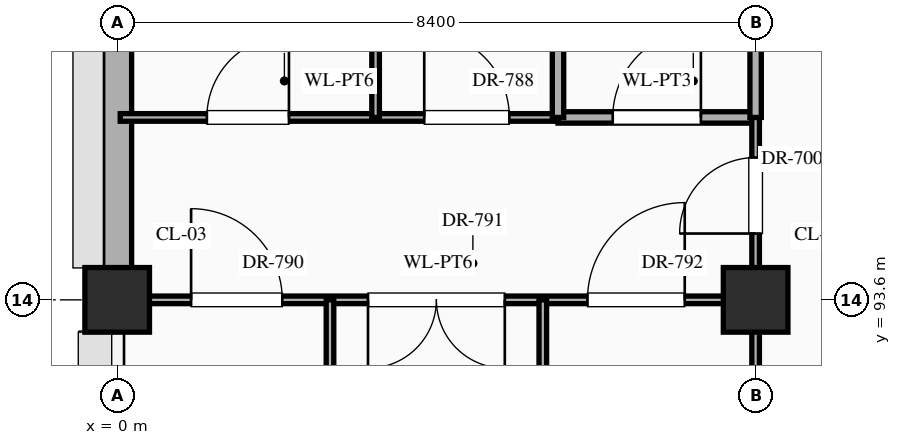
"""IFC4 building model, lengths in metres.
Left out: names, types, materials, properties, quantities, classifications, styles, units other than length and angle.
Written with IfcOpenShell. Run it as: python <this file> out.ifc"""

import sys

from ifc_helpers import new_model, si_unit, direction, frame, frame_2d, origin, origin_2d, place, context, subcontext, project, spatial, rectangle, extrude, element, fill, save


model = new_model("IFC4")
c1 = context("Model", 3, precision=1e-05, world=origin(), true_north=direction((0.0, 1.0)))
c2 = subcontext(c1, "Body", "Model", "MODEL_VIEW")
j1 = project(units=[si_unit("LENGTHUNIT", "METRE"), si_unit("PLANEANGLEUNIT", "RADIAN")], contexts=[c1])
p1 = place(None, origin())
s1 = spatial("IfcSite", under=j1, at=p1, CompositionType="ELEMENT")
p2 = place(p1, origin())
s2 = spatial("IfcBuilding", under=s1, at=p2, CompositionType="ELEMENT")
p3 = place(p2, origin())
s3 = spatial("IfcBuildingStorey", under=s2, at=p3, CompositionType="ELEMENT", Elevation=0.0)
for number, where, z_axis, x_axis in (
    (1, (0.0, 93.6, 0.0), (0.0, 0.0, 1.0), (1.0, 0.0, 0.0)),
    (2, (8.4, 93.6, 0.0), (0.0, 0.0, 1.0), (1.0, 0.0, 0.0)),
):
    element("IfcColumn", number, at=place(p3, frame(where, z_axis=z_axis, x_axis=x_axis)), inside=s3, PredefinedType="COLUMN", context=c2, shape_type="SweptSolid", body=[
        extrude(rectangle(XDim=0.85, YDim=0.85, at=origin_2d()), origin(), (0.0, 0.0, 1.0), 5.4),
    ])
p4 = place(p3, frame((0.0, 94.02, 0.0), z_axis=(0.0, 0.0, 1.0), x_axis=(0.0, 1.0, 0.0)))
e3 = element("IfcWall", 3, at=p4, inside=s3, PredefinedType="STANDARD", context=c2, shape_type="SweptSolid", body=[
    extrude(rectangle(XDim=6.36, YDim=0.38, at=frame_2d((3.18, 0.0))), origin(), (0.0, 0.0, 1.0), 4.47),
])
p5 = place(p4, frame((3.805, 0.0, 0.85)))
e4 = element("IfcOpeningElement", 4, at=p5, cuts=e3, PredefinedType="OPENING", context=c2, shape_type="SweptSolid", body=[
    extrude(rectangle(XDim=1.35, YDim=1.92, at=frame_2d((0.675, 0.96))), frame((0.0, 0.202, 0.0), z_axis=(0.0, -1.0, 0.0), x_axis=(1.0, 0.0, 0.0)), (0.0, 0.0, 1.0), 0.404),
])
p6 = place(p3, frame((0.04, 93.6, 0.0), z_axis=(0.0, 0.0, 1.0), x_axis=(1.0, 0.0, 0.0)))
e5 = element("IfcWall", 5, at=p6, inside=s3, PredefinedType="STANDARD", context=c2, shape_type="SweptSolid", body=[
    extrude(rectangle(XDim=8.36, YDim=0.1, at=frame_2d((4.18, 0.0))), origin(), (0.0, 0.0, 1.0), 4.27),
])
p7 = place(p6, frame((0.933, 0.0, 0.0)))
e6 = element("IfcOpeningElement", 6, at=p7, cuts=e5, PredefinedType="OPENING", context=c2, shape_type="SweptSolid", body=[
    extrude(rectangle(XDim=1.2, YDim=2.35, at=frame_2d((0.6, 1.175))), frame((0.0, 0.062, 0.0), z_axis=(0.0, -1.0, 0.0), x_axis=(1.0, 0.0, 0.0)), (0.0, 0.0, 1.0), 0.124),
])
p8 = place(p6, frame((3.26, 0.0, 0.0)))
e7 = element("IfcOpeningElement", 7, at=p8, cuts=e5, PredefinedType="OPENING", context=c2, shape_type="SweptSolid", body=[
    extrude(rectangle(XDim=1.8, YDim=2.5, at=frame_2d((0.9, 1.25))), frame((0.0, 0.062, 0.0), z_axis=(0.0, -1.0, 0.0), x_axis=(1.0, 0.0, 0.0)), (0.0, 0.0, 1.0), 0.124),
])
p9 = place(p6, frame((6.147, 0.0, 0.0)))
e8 = element("IfcOpeningElement", 8, at=p9, cuts=e5, PredefinedType="OPENING", context=c2, shape_type="SweptSolid", body=[
    extrude(rectangle(XDim=1.28, YDim=2.35, at=frame_2d((0.64, 1.175))), frame((0.0, 0.062, 0.0), z_axis=(0.0, -1.0, 0.0), x_axis=(1.0, 0.0, 0.0)), (0.0, 0.0, 1.0), 0.124),
])
p10 = place(p3, frame((0.04, 96.0, 0.0), z_axis=(0.0, 0.0, 1.0), x_axis=(1.0, 0.0, 0.0)))
e9 = element("IfcWall", 9, at=p10, inside=s3, PredefinedType="STANDARD", context=c2, shape_type="SweptSolid", body=[
    extrude(rectangle(XDim=5.76, YDim=0.1, at=frame_2d((2.88, 0.0))), origin(), (0.0, 0.0, 1.0), 5.12),
])
p11 = place(p10, frame((1.14, 0.0, 0.0)))
e10 = element("IfcOpeningElement", 10, at=p11, cuts=e9, PredefinedType="OPENING", context=c2, shape_type="SweptSolid", body=[
    extrude(rectangle(XDim=1.08, YDim=2.25, at=frame_2d((0.54, 1.125))), frame((0.0, 0.062, 0.0), z_axis=(0.0, -1.0, 0.0), x_axis=(1.0, 0.0, 0.0)), (0.0, 0.0, 1.0), 0.124),
])
p12 = place(p10, frame((4.0, 0.0, 0.0)))
e11 = element("IfcOpeningElement", 11, at=p12, cuts=e9, PredefinedType="OPENING", context=c2, shape_type="SweptSolid", body=[
    extrude(rectangle(XDim=1.12, YDim=2.25, at=frame_2d((0.56, 1.125))), frame((0.0, 0.062, 0.0), z_axis=(0.0, -1.0, 0.0), x_axis=(1.0, 0.0, 0.0)), (0.0, 0.0, 1.0), 0.124),
])
p13 = place(p3, frame((5.8, 96.0, 0.0), z_axis=(0.0, 0.0, 1.0), x_axis=(1.0, 0.0, 0.0)))
e12 = element("IfcWall", 12, at=p13, inside=s3, PredefinedType="STANDARD", context=c2, shape_type="SweptSolid", body=[
    extrude(rectangle(XDim=2.6, YDim=0.15, at=frame_2d((1.3, 0.0))), origin(), (0.0, 0.0, 1.0), 5.12),
])
p14 = place(p13, frame((0.72, 0.0, 0.0)))
e13 = element("IfcOpeningElement", 13, at=p14, cuts=e12, PredefinedType="OPENING", context=c2, shape_type="SweptSolid", body=[
    extrude(rectangle(XDim=1.16, YDim=2.3, at=frame_2d((0.58, 1.15))), frame((0.0, 0.087, 0.0), z_axis=(0.0, -1.0, 0.0), x_axis=(1.0, 0.0, 0.0)), (0.0, 0.0, 1.0), 0.174),
])
p15 = place(p3, frame((2.8, 86.4, 0.0), z_axis=(0.0, 0.0, 1.0), x_axis=(0.0, 1.0, 0.0)))
e14 = element("IfcWall", 14, at=p15, inside=s3, PredefinedType="STANDARD", context=c2, shape_type="SweptSolid", body=[
    extrude(rectangle(XDim=7.2, YDim=0.1, at=frame_2d((3.6, 0.0))), origin(), (0.0, 0.0, 1.0), 5.12),
])
p16 = place(p15, frame((3.02, 0.0, 0.0)))
e15 = element("IfcOpeningElement", 15, at=p16, cuts=e14, PredefinedType="OPENING", context=c2, shape_type="SweptSolid", body=[
    extrude(rectangle(XDim=1.16, YDim=2.3, at=frame_2d((0.58, 1.15))), frame((0.0, 0.062, 0.0), z_axis=(0.0, -1.0, 0.0), x_axis=(1.0, 0.0, 0.0)), (0.0, 0.0, 1.0), 0.124),
])
p17 = place(p3, frame((3.4, 96.0, 0.0), z_axis=(0.0, 0.0, 1.0), x_axis=(0.0, 1.0, 0.0)))
e16 = element("IfcWall", 16, at=p17, inside=s3, PredefinedType="STANDARD", context=c2, shape_type="SweptSolid", body=[
    extrude(rectangle(XDim=4.8, YDim=0.1, at=frame_2d((2.4, 0.0))), origin(), (0.0, 0.0, 1.0), 5.12),
])
p18 = place(p17, frame((1.76, 0.0, 0.0)))
e17 = element("IfcOpeningElement", 17, at=p18, cuts=e16, PredefinedType="OPENING", context=c2, shape_type="SweptSolid", body=[
    extrude(rectangle(XDim=1.28, YDim=2.35, at=frame_2d((0.64, 1.175))), frame((0.0, 0.062, 0.0), z_axis=(0.0, -1.0, 0.0), x_axis=(1.0, 0.0, 0.0)), (0.0, 0.0, 1.0), 0.124),
])
p19 = place(p3, frame((5.6, 86.4, 0.0), z_axis=(0.0, 0.0, 1.0), x_axis=(0.0, 1.0, 0.0)))
e18 = element("IfcWall", 18, at=p19, inside=s3, PredefinedType="STANDARD", context=c2, shape_type="SweptSolid", body=[
    extrude(rectangle(XDim=7.2, YDim=0.1, at=frame_2d((3.6, 0.0))), origin(), (0.0, 0.0, 1.0), 5.12),
])
p20 = place(p19, frame((2.98, 0.0, 0.0)))
e19 = element("IfcOpeningElement", 19, at=p20, cuts=e18, PredefinedType="OPENING", context=c2, shape_type="SweptSolid", body=[
    extrude(rectangle(XDim=1.24, YDim=2.3, at=frame_2d((0.62, 1.15))), frame((0.0, 0.062, 0.0), z_axis=(0.0, -1.0, 0.0), x_axis=(1.0, 0.0, 0.0)), (0.0, 0.0, 1.0), 0.124),
])
p21 = place(p3, frame((5.8, 96.0, 0.0), z_axis=(0.0, 0.0, 1.0), x_axis=(0.0, 1.0, 0.0)))
e20 = element("IfcWall", 20, at=p21, inside=s3, PredefinedType="STANDARD", context=c2, shape_type="SweptSolid", body=[
    extrude(rectangle(XDim=4.8, YDim=0.15, at=frame_2d((2.4, 0.0))), origin(), (0.0, 0.0, 1.0), 5.12),
])
p22 = place(p21, frame((1.93, 0.0, 0.0)))
e21 = element("IfcOpeningElement", 21, at=p22, cuts=e20, PredefinedType="OPENING", context=c2, shape_type="SweptSolid", body=[
    extrude(rectangle(XDim=0.94, YDim=2.3, at=frame_2d((0.47, 1.15))), frame((0.0, 0.087, 0.0), z_axis=(0.0, -1.0, 0.0), x_axis=(1.0, 0.0, 0.0)), (0.0, 0.0, 1.0), 0.174),
])
p23 = place(p3, frame((8.4, 43.2, 0.0), z_axis=(0.0, 0.0, 1.0), x_axis=(0.0, 1.0, 0.0)))
e22 = element("IfcWall", 22, at=p23, inside=s3, PredefinedType="STANDARD", context=c2, shape_type="SweptSolid", body=[
    extrude(rectangle(XDim=52.8, YDim=0.1, at=frame_2d((26.4, 0.0))), origin(), (0.0, 0.0, 1.0), 4.37),
])
p24 = place(p23, frame((51.272, 0.0, 0.0)))
e23 = element("IfcOpeningElement", 23, at=p24, cuts=e22, PredefinedType="OPENING", context=c2, shape_type="SweptSolid", body=[
    extrude(rectangle(XDim=1.0, YDim=2.25, at=frame_2d((0.5, 1.125))), frame((0.0, 0.062, 0.0), z_axis=(0.0, -1.0, 0.0), x_axis=(1.0, 0.0, 0.0)), (0.0, 0.0, 1.0), 0.124),
])
p25 = place(p23, frame((46.26, 0.0, 0.0)))
e24 = element("IfcOpeningElement", 24, at=p25, cuts=e22, PredefinedType="OPENING", context=c2, shape_type="SweptSolid", body=[
    extrude(rectangle(XDim=1.08, YDim=2.25, at=frame_2d((0.54, 1.125))), frame((0.0, 0.062, 0.0), z_axis=(0.0, -1.0, 0.0), x_axis=(1.0, 0.0, 0.0)), (0.0, 0.0, 1.0), 0.124),
])
p26 = place(p23, frame((41.268, 0.0, 0.0)))
e25 = element("IfcOpeningElement", 25, at=p26, cuts=e22, PredefinedType="OPENING", context=c2, shape_type="SweptSolid", body=[
    extrude(rectangle(XDim=1.12, YDim=2.25, at=frame_2d((0.56, 1.125))), frame((0.0, 0.062, 0.0), z_axis=(0.0, -1.0, 0.0), x_axis=(1.0, 0.0, 0.0)), (0.0, 0.0, 1.0), 0.124),
])
p27 = place(p23, frame((37.992, 0.0, 0.0)))
e26 = element("IfcOpeningElement", 26, at=p27, cuts=e22, PredefinedType="OPENING", context=c2, shape_type="SweptSolid", body=[
    extrude(rectangle(XDim=1.16, YDim=2.3, at=frame_2d((0.58, 1.15))), frame((0.0, 0.062, 0.0), z_axis=(0.0, -1.0, 0.0), x_axis=(1.0, 0.0, 0.0)), (0.0, 0.0, 1.0), 0.124),
])
p28 = place(p23, frame((17.38, 0.0, 0.0)))
e27 = element("IfcOpeningElement", 27, at=p28, cuts=e22, PredefinedType="OPENING", context=c2, shape_type="SweptSolid", body=[
    extrude(rectangle(XDim=1.24, YDim=2.3, at=frame_2d((0.62, 1.15))), frame((0.0, 0.062, 0.0), z_axis=(0.0, -1.0, 0.0), x_axis=(1.0, 0.0, 0.0)), (0.0, 0.0, 1.0), 0.124),
])
p29 = place(p23, frame((24.56, 0.0, 0.0)))
e28 = element("IfcOpeningElement", 28, at=p29, cuts=e22, PredefinedType="OPENING", context=c2, shape_type="SweptSolid", body=[
    extrude(rectangle(XDim=1.28, YDim=2.35, at=frame_2d((0.64, 1.175))), frame((0.0, 0.062, 0.0), z_axis=(0.0, -1.0, 0.0), x_axis=(1.0, 0.0, 0.0)), (0.0, 0.0, 1.0), 0.124),
])
p30 = place(p23, frame((31.93, 0.0, 0.0)))
e29 = element("IfcOpeningElement", 29, at=p30, cuts=e22, PredefinedType="OPENING", context=c2, shape_type="SweptSolid", body=[
    extrude(rectangle(XDim=0.94, YDim=2.3, at=frame_2d((0.47, 1.15))), frame((0.0, 0.062, 0.0), z_axis=(0.0, -1.0, 0.0), x_axis=(1.0, 0.0, 0.0)), (0.0, 0.0, 1.0), 0.124),
])
p31 = place(p23, frame((0.772, 0.0, 0.0)))
e30 = element("IfcOpeningElement", 30, at=p31, cuts=e22, PredefinedType="OPENING", context=c2, shape_type="SweptSolid", body=[
    extrude(rectangle(XDim=1.2, YDim=2.35, at=frame_2d((0.6, 1.175))), frame((0.0, 0.062, 0.0), z_axis=(0.0, -1.0, 0.0), x_axis=(1.0, 0.0, 0.0)), (0.0, 0.0, 1.0), 0.124),
])
p32 = place(p23, frame((4.008, 0.0, 0.0)))
e31 = element("IfcOpeningElement", 31, at=p32, cuts=e22, PredefinedType="OPENING", context=c2, shape_type="SweptSolid", body=[
    extrude(rectangle(XDim=1.24, YDim=2.3, at=frame_2d((0.62, 1.15))), frame((0.0, 0.062, 0.0), z_axis=(0.0, -1.0, 0.0), x_axis=(1.0, 0.0, 0.0)), (0.0, 0.0, 1.0), 0.124),
])
p33 = place(p23, frame((10.16, 0.0, 0.0)))
e32 = element("IfcOpeningElement", 32, at=p33, cuts=e22, PredefinedType="OPENING", context=c2, shape_type="SweptSolid", body=[
    extrude(rectangle(XDim=1.28, YDim=2.35, at=frame_2d((0.64, 1.175))), frame((0.0, 0.062, 0.0), z_axis=(0.0, -1.0, 0.0), x_axis=(1.0, 0.0, 0.0)), (0.0, 0.0, 1.0), 0.124),
])
p34 = place(p3, frame((8.4, 96.0, 0.0), z_axis=(0.0, 0.0, 1.0), x_axis=(0.0, 1.0, 0.0)))
e33 = element("IfcWall", 33, at=p34, inside=s3, PredefinedType="STANDARD", context=c2, shape_type="SweptSolid", body=[
    extrude(rectangle(XDim=4.8, YDim=0.15, at=frame_2d((2.4, 0.0))), origin(), (0.0, 0.0, 1.0), 4.37),
])
p35 = place(p34, frame((1.708, 0.0, 0.0)))
e34 = element("IfcOpeningElement", 34, at=p35, cuts=e33, PredefinedType="OPENING", context=c2, shape_type="SweptSolid", body=[
    extrude(rectangle(XDim=1.04, YDim=2.2, at=frame_2d((0.52, 1.1))), frame((0.0, 0.087, 0.0), z_axis=(0.0, -1.0, 0.0), x_axis=(1.0, 0.0, 0.0)), (0.0, 0.0, 1.0), 0.174),
])
p36 = place(p24, origin())
e35 = element("IfcDoor", 35, at=p36, inside=s3, OperationType="SINGLE_SWING_LEFT", PredefinedType="DOOR", context=c2, shape_type="SweptSolid", body=[
    extrude(rectangle(XDim=1.0, YDim=2.25, at=frame_2d((0.5, 1.125))), frame((0.0, 0.025, 0.0), z_axis=(0.0, -1.0, 0.0), x_axis=(1.0, 0.0, 0.0)), (0.0, 0.0, 1.0), 0.05),
])
fill(e23, e35)
p37 = place(p11, origin())
e36 = element("IfcDoor", 36, at=p37, inside=s3, OperationType="SINGLE_SWING_RIGHT", PredefinedType="DOOR", context=c2, shape_type="SweptSolid", body=[
    extrude(rectangle(XDim=1.08, YDim=2.25, at=frame_2d((0.54, 1.125))), frame((0.0, 0.025, 0.0), z_axis=(0.0, -1.0, 0.0), x_axis=(1.0, 0.0, 0.0)), (0.0, 0.0, 1.0), 0.05),
])
fill(e10, e36)
p38 = place(p12, origin())
e37 = element("IfcDoor", 37, at=p38, inside=s3, OperationType="SINGLE_SWING_LEFT", PredefinedType="DOOR", context=c2, shape_type="SweptSolid", body=[
    extrude(rectangle(XDim=1.12, YDim=2.25, at=frame_2d((0.56, 1.125))), frame((0.0, 0.025, 0.0), z_axis=(0.0, -1.0, 0.0), x_axis=(1.0, 0.0, 0.0)), (0.0, 0.0, 1.0), 0.05),
])
fill(e11, e37)
p39 = place(p14, origin())
e38 = element("IfcDoor", 38, at=p39, inside=s3, OperationType="SINGLE_SWING_RIGHT", PredefinedType="DOOR", context=c2, shape_type="SweptSolid", body=[
    extrude(rectangle(XDim=1.16, YDim=2.3, at=frame_2d((0.58, 1.15))), frame((0.0, 0.025, 0.0), z_axis=(0.0, -1.0, 0.0), x_axis=(1.0, 0.0, 0.0)), (0.0, 0.0, 1.0), 0.05),
])
fill(e13, e38)
p40 = place(p7, origin())
e39 = element("IfcDoor", 39, at=p40, inside=s3, OperationType="SINGLE_SWING_LEFT", PredefinedType="DOOR", context=c2, shape_type="SweptSolid", body=[
    extrude(rectangle(XDim=1.2, YDim=2.35, at=frame_2d((0.6, 1.175))), frame((0.0, 0.025, 0.0), z_axis=(0.0, -1.0, 0.0), x_axis=(1.0, 0.0, 0.0)), (0.0, 0.0, 1.0), 0.05),
])
fill(e6, e39)
p41 = place(p8, frame((1.8, 0.0, 0.0), z_axis=(0.0, 0.0, 1.0), x_axis=(-1.0, 0.0, 0.0)))
e40 = element("IfcDoor", 40, at=p41, inside=s3, OperationType="DOUBLE_DOOR_SINGLE_SWING", PredefinedType="DOOR", context=c2, shape_type="SweptSolid", body=[
    extrude(rectangle(XDim=1.8, YDim=2.5, at=frame_2d((0.9, 1.25))), frame((0.0, 0.025, 0.0), z_axis=(0.0, -1.0, 0.0), x_axis=(1.0, 0.0, 0.0)), (0.0, 0.0, 1.0), 0.05),
])
fill(e7, e40)
p42 = place(p9, origin())
e41 = element("IfcDoor", 41, at=p42, inside=s3, OperationType="SINGLE_SWING_RIGHT", PredefinedType="DOOR", context=c2, shape_type="SweptSolid", body=[
    extrude(rectangle(XDim=1.28, YDim=2.35, at=frame_2d((0.64, 1.175))), frame((0.0, 0.025, 0.0), z_axis=(0.0, -1.0, 0.0), x_axis=(1.0, 0.0, 0.0)), (0.0, 0.0, 1.0), 0.05),
])
fill(e8, e41)
save(model, sys.argv[1])
